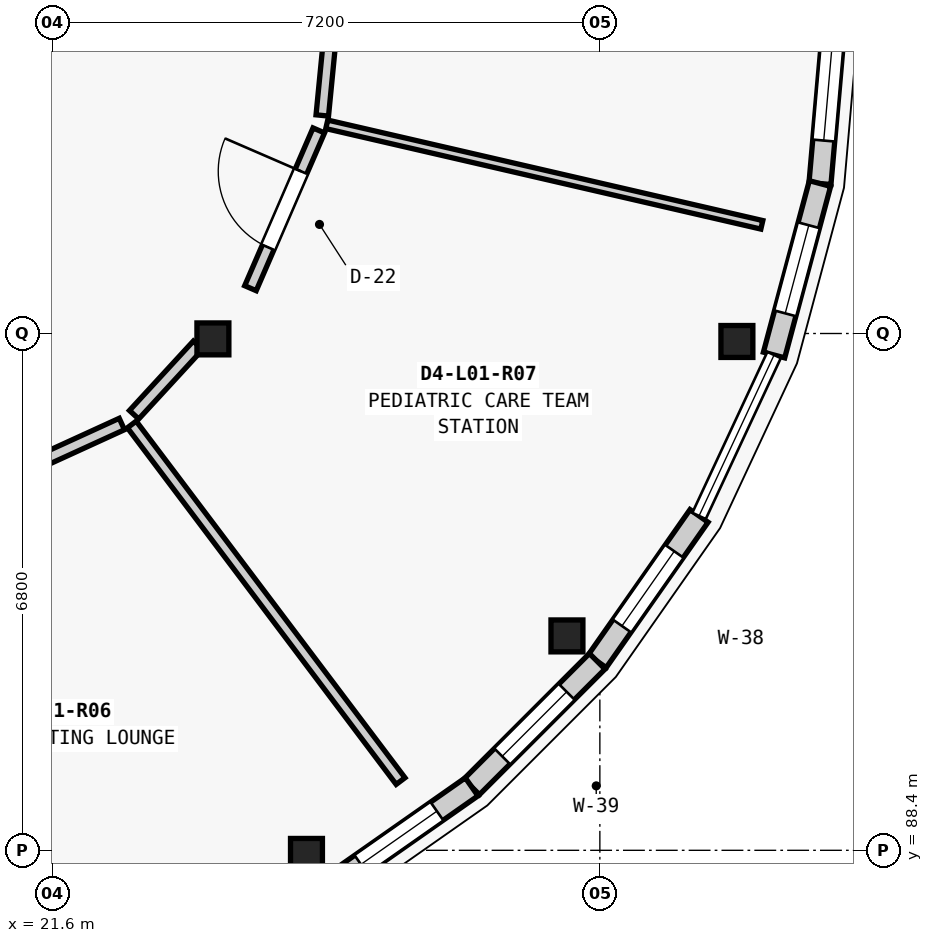
"""IFC4 building model, lengths in metres.
Left out: names, types, materials, properties, quantities, classifications, styles, units other than length and angle.
Written with IfcOpenShell. Run it as: python <this file> out.ifc"""

import sys

from ifc_helpers import new_model, si_unit, direction, frame, frame_2d, origin, origin_2d, place, context, subcontext, project, spatial, rectangle, extrude, element, fill, save


model = new_model("IFC4")
c1 = context("Model", 3, precision=1e-05, world=origin(), true_north=direction((0.0, 1.0)))
c2 = subcontext(c1, "Body", "Model", "MODEL_VIEW")
j1 = project(units=[si_unit("LENGTHUNIT", "METRE"), si_unit("PLANEANGLEUNIT", "RADIAN")], contexts=[c1])
p1 = place(None, origin())
s1 = spatial("IfcSite", under=j1, at=p1, CompositionType="ELEMENT")
p2 = place(p1, origin())
s2 = spatial("IfcBuilding", under=s1, at=p2, CompositionType="ELEMENT")
p3 = place(p2, frame((0.0, 0.0, 4.55)))
s3 = spatial("IfcBuildingStorey", under=s2, at=p3, CompositionType="ELEMENT", Elevation=4.55)
for number, where, z_axis, x_axis in (
    (1, (24.94, 88.346, 0.0), (0.0, 0.0, 1.0), (1.0, 0.0, 0.0)),
    (2, (28.367, 91.221, 0.0), (0.0, 0.0, 1.0), (1.0, 0.0, 0.0)),
    (3, (30.603, 95.095, 0.0), (0.0, 0.0, 1.0), (1.0, 0.0, 0.0)),
    (4, (23.709, 95.129, 0.0), (0.0, 0.0, 1.0), (1.0, 0.0, 0.0)),
):
    element("IfcColumn", number, at=place(p3, frame(where, z_axis=z_axis, x_axis=x_axis)), inside=s3, PredefinedType="COLUMN", context=c2, shape_type="SweptSolid", body=[
        extrude(rectangle(XDim=0.42, YDim=0.42, at=origin_2d()), origin(), (0.0, 0.0, 1.0), 4.2),
    ])
p4 = place(p3, frame((31.9, 99.5, 0.0), z_axis=(0.0, 0.0, 1.0), x_axis=(-0.087274565792, -0.996184295282, 0.0)))
e5 = element("IfcWall", 5, at=p4, inside=s3, PredefinedType="ELEMENTEDWALL", context=c2, shape_type="SweptSolid", body=[
    extrude(rectangle(XDim=2.336, YDim=0.29, at=frame_2d((1.168, 0.0))), origin(), (0.0, 0.0, 1.0), 3.309),
])
p5 = place(p4, frame((0.568, 0.0, 0.85)))
e6 = element("IfcOpeningElement", 6, at=p5, cuts=e5, PredefinedType="OPENING", context=c2, shape_type="SweptSolid", body=[
    extrude(rectangle(XDim=1.2, YDim=1.35, at=frame_2d((0.6, 0.675))), frame((0.0, 0.155, 0.0), z_axis=(0.0, -1.0, 0.0), x_axis=(1.0, 0.0, 0.0)), (0.0, 0.0, 1.0), 0.31),
])
p6 = place(p3, frame((31.696, 97.173, 0.0), z_axis=(0.0, 0.0, 1.0), x_axis=(-0.258612423585, -0.965981166673, 0.0)))
e7 = element("IfcWall", 7, at=p6, inside=s3, PredefinedType="ELEMENTEDWALL", context=c2, shape_type="SweptSolid", body=[
    extrude(rectangle(XDim=2.335, YDim=0.29, at=frame_2d((1.168, 0.0))), origin(), (0.0, 0.0, 1.0), 3.309),
])
p7 = place(p6, frame((0.568, 0.0, 0.85)))
e8 = element("IfcOpeningElement", 8, at=p7, cuts=e7, PredefinedType="OPENING", context=c2, shape_type="SweptSolid", body=[
    extrude(rectangle(XDim=1.2, YDim=1.65, at=frame_2d((0.6, 0.825))), frame((0.0, 0.155, 0.0), z_axis=(0.0, -1.0, 0.0), x_axis=(1.0, 0.0, 0.0)), (0.0, 0.0, 1.0), 0.31),
])
p8 = place(p3, frame((30.105, 92.8, 0.0), z_axis=(0.0, 0.0, 1.0), x_axis=(-0.573728883722, -0.819045278347, 0.0)))
e9 = element("IfcWall", 9, at=p8, inside=s3, PredefinedType="ELEMENTEDWALL", context=c2, shape_type="SweptSolid", body=[
    extrude(rectangle(XDim=2.336, YDim=0.29, at=frame_2d((1.168, 0.0))), origin(), (0.0, 0.0, 1.0), 3.309),
])
p9 = place(p8, frame((0.568, 0.0, 0.85)))
e10 = element("IfcOpeningElement", 10, at=p9, cuts=e9, PredefinedType="OPENING", context=c2, shape_type="SweptSolid", body=[
    extrude(rectangle(XDim=1.2, YDim=1.95, at=frame_2d((0.6, 0.975))), frame((0.0, 0.155, 0.0), z_axis=(0.0, -1.0, 0.0), x_axis=(1.0, 0.0, 0.0)), (0.0, 0.0, 1.0), 0.31),
])
p10 = place(p3, frame((28.765, 90.887, 0.0), z_axis=(0.0, 0.0, 1.0), x_axis=(-0.707106781187, -0.707106781187, 0.0)))
e11 = element("IfcWall", 11, at=p10, inside=s3, PredefinedType="ELEMENTEDWALL", context=c2, shape_type="SweptSolid", body=[
    extrude(rectangle(XDim=2.336, YDim=0.29, at=frame_2d((1.168, 0.0))), origin(), (0.0, 0.0, 1.0), 3.309),
])
p11 = place(p10, frame((0.568, 0.0, 0.85)))
e12 = element("IfcOpeningElement", 12, at=p11, cuts=e11, PredefinedType="OPENING", context=c2, shape_type="SweptSolid", body=[
    extrude(rectangle(XDim=1.2, YDim=2.25, at=frame_2d((0.6, 1.125))), frame((0.0, 0.155, 0.0), z_axis=(0.0, -1.0, 0.0), x_axis=(1.0, 0.0, 0.0)), (0.0, 0.0, 1.0), 0.31),
])
p12 = place(p3, frame((27.113, 89.235, 0.0), z_axis=(0.0, 0.0, 1.0), x_axis=(-0.819045278347, -0.573728883722, 0.0)))
e13 = element("IfcWall", 13, at=p12, inside=s3, PredefinedType="ELEMENTEDWALL", context=c2, shape_type="SweptSolid", body=[
    extrude(rectangle(XDim=2.336, YDim=0.29, at=frame_2d((1.168, 0.0))), origin(), (0.0, 0.0, 1.0), 3.309),
])
p13 = place(p12, frame((0.558, 0.0, 0.85)))
e14 = element("IfcOpeningElement", 14, at=p13, cuts=e13, PredefinedType="OPENING", context=c2, shape_type="SweptSolid", body=[
    extrude(rectangle(XDim=1.22, YDim=1.5, at=frame_2d((0.61, 0.75))), frame((0.0, 0.155, 0.0), z_axis=(0.0, -1.0, 0.0), x_axis=(1.0, 0.0, 0.0)), (0.0, 0.0, 1.0), 0.31),
])
p14 = place(p3, frame((22.642, 94.003, 0.0), z_axis=(0.0, 0.0, 1.0), x_axis=(0.601846782462, -0.798611576701, 0.0)))
e15 = element("IfcWall", 15, at=p14, inside=s3, PredefinedType="PARTITIONING", context=c2, shape_type="SweptSolid", body=[
    extrude(rectangle(XDim=5.875, YDim=0.145, at=frame_2d((2.938, 0.0))), origin(), (0.0, 0.0, 1.0), 3.284),
])
p15 = place(p3, frame((25.207, 97.952, 0.0), z_axis=(0.0, 0.0, 1.0), x_axis=(0.97434915279, -0.225041614944, 0.0)))
e16 = element("IfcWall", 16, at=p15, inside=s3, PredefinedType="PARTITIONING", context=c2, shape_type="SweptSolid", body=[
    extrude(rectangle(XDim=5.875, YDim=0.115, at=frame_2d((2.937, 0.0))), origin(), (0.0, 0.0, 1.0), 3.284),
])
p16 = place(p3, frame((20.03, 92.874, 0.0), z_axis=(0.0, 0.0, 1.0), x_axis=(0.909355526696, 0.416019862587, 0.0)))
e17 = element("IfcWall", 17, at=p16, inside=s3, PredefinedType="PARTITIONING", context=c2, shape_type="SweptSolid", body=[
    extrude(rectangle(XDim=2.728, YDim=0.165, at=frame_2d((1.364, 0.0))), origin(), (0.0, 0.0, 1.0), 3.284),
])
p17 = place(p3, frame((22.672, 94.131, 0.0), z_axis=(0.0, 0.0, 1.0), x_axis=(0.677069322474, 0.735919243236, 0.0)))
e18 = element("IfcWall", 18, at=p17, inside=s3, PredefinedType="PARTITIONING", context=c2, shape_type="SweptSolid", body=[
    extrude(rectangle(XDim=1.24, YDim=0.165, at=frame_2d((0.62, 0.0))), origin(), (0.0, 0.0, 1.0), 3.284),
])
p18 = place(p3, frame((24.203, 95.796, 0.0), z_axis=(0.0, 0.0, 1.0), x_axis=(0.397419678039, 0.917636964985, 0.0)))
e19 = element("IfcWall", 19, at=p18, inside=s3, PredefinedType="PARTITIONING", context=c2, shape_type="SweptSolid", body=[
    extrude(rectangle(XDim=2.262, YDim=0.165, at=frame_2d((1.131, 0.0))), origin(), (0.0, 0.0, 1.0), 3.284),
])
p19 = place(p18, frame((0.586, 0.0, 0.0)))
e20 = element("IfcOpeningElement", 20, at=p19, cuts=e19, PredefinedType="OPENING", context=c2, shape_type="SweptSolid", body=[
    extrude(rectangle(XDim=1.09, YDim=2.22, at=frame_2d((0.545, 1.11))), frame((0.0, 0.093, 0.0), z_axis=(0.0, -1.0, 0.0), x_axis=(1.0, 0.0, 0.0)), (0.0, 0.0, 1.0), 0.185),
])
p20 = place(p3, frame((25.148, 98.069, 0.0), z_axis=(0.0, 0.0, 1.0), x_axis=(0.097273334628, 0.995257704502, 0.0)))
e21 = element("IfcWall", 21, at=p20, inside=s3, PredefinedType="PARTITIONING", context=c2, shape_type="SweptSolid", body=[
    extrude(rectangle(XDim=1.225, YDim=0.165, at=frame_2d((0.612, 0.0))), origin(), (0.0, 0.0, 1.0), 3.284),
])
p21 = place(p5, origin())
e22 = element("IfcWindow", 22, at=p21, inside=s3, PartitioningType="SINGLE_PANEL", PredefinedType="WINDOW", context=c2, shape_type="SweptSolid", body=[
    extrude(rectangle(XDim=1.2, YDim=1.35, at=frame_2d((0.6, 0.675))), frame((0.0, 0.03, 0.0), z_axis=(0.0, -1.0, 0.0), x_axis=(1.0, 0.0, 0.0)), (0.0, 0.0, 1.0), 0.06),
])
fill(e6, e22)
p22 = place(p7, origin())
e23 = element("IfcWindow", 23, at=p22, inside=s3, PartitioningType="SINGLE_PANEL", PredefinedType="WINDOW", context=c2, shape_type="SweptSolid", body=[
    extrude(rectangle(XDim=1.2, YDim=1.65, at=frame_2d((0.6, 0.825))), frame((0.0, 0.03, 0.0), z_axis=(0.0, -1.0, 0.0), x_axis=(1.0, 0.0, 0.0)), (0.0, 0.0, 1.0), 0.06),
])
fill(e8, e23)
p23 = place(p9, origin())
e24 = element("IfcWindow", 24, at=p23, inside=s3, PartitioningType="SINGLE_PANEL", PredefinedType="WINDOW", context=c2, shape_type="SweptSolid", body=[
    extrude(rectangle(XDim=1.2, YDim=1.95, at=frame_2d((0.6, 0.975))), frame((0.0, 0.03, 0.0), z_axis=(0.0, -1.0, 0.0), x_axis=(1.0, 0.0, 0.0)), (0.0, 0.0, 1.0), 0.06),
])
fill(e10, e24)
p24 = place(p11, origin())
e25 = element("IfcWindow", 25, at=p24, inside=s3, PartitioningType="SINGLE_PANEL", PredefinedType="WINDOW", context=c2, shape_type="SweptSolid", body=[
    extrude(rectangle(XDim=1.2, YDim=2.25, at=frame_2d((0.6, 1.125))), frame((0.0, 0.03, 0.0), z_axis=(0.0, -1.0, 0.0), x_axis=(1.0, 0.0, 0.0)), (0.0, 0.0, 1.0), 0.06),
])
fill(e12, e25)
p25 = place(p13, origin())
e26 = element("IfcWindow", 26, at=p25, inside=s3, PartitioningType="SINGLE_PANEL", PredefinedType="WINDOW", context=c2, shape_type="SweptSolid", body=[
    extrude(rectangle(XDim=1.22, YDim=1.5, at=frame_2d((0.61, 0.75))), frame((0.0, 0.03, 0.0), z_axis=(0.0, -1.0, 0.0), x_axis=(1.0, 0.0, 0.0)), (0.0, 0.0, 1.0), 0.06),
])
fill(e14, e26)
p26 = place(p19, origin())
e27 = element("IfcDoor", 27, at=p26, inside=s3, OperationType="SINGLE_SWING_RIGHT", PredefinedType="DOOR", context=c2, shape_type="SweptSolid", body=[
    extrude(rectangle(XDim=1.09, YDim=2.22, at=frame_2d((0.545, 1.11))), frame((0.0, 0.025, 0.0), z_axis=(0.0, -1.0, 0.0), x_axis=(1.0, 0.0, 0.0)), (0.0, 0.0, 1.0), 0.05),
])
fill(e20, e27)
save(model, sys.argv[1])
